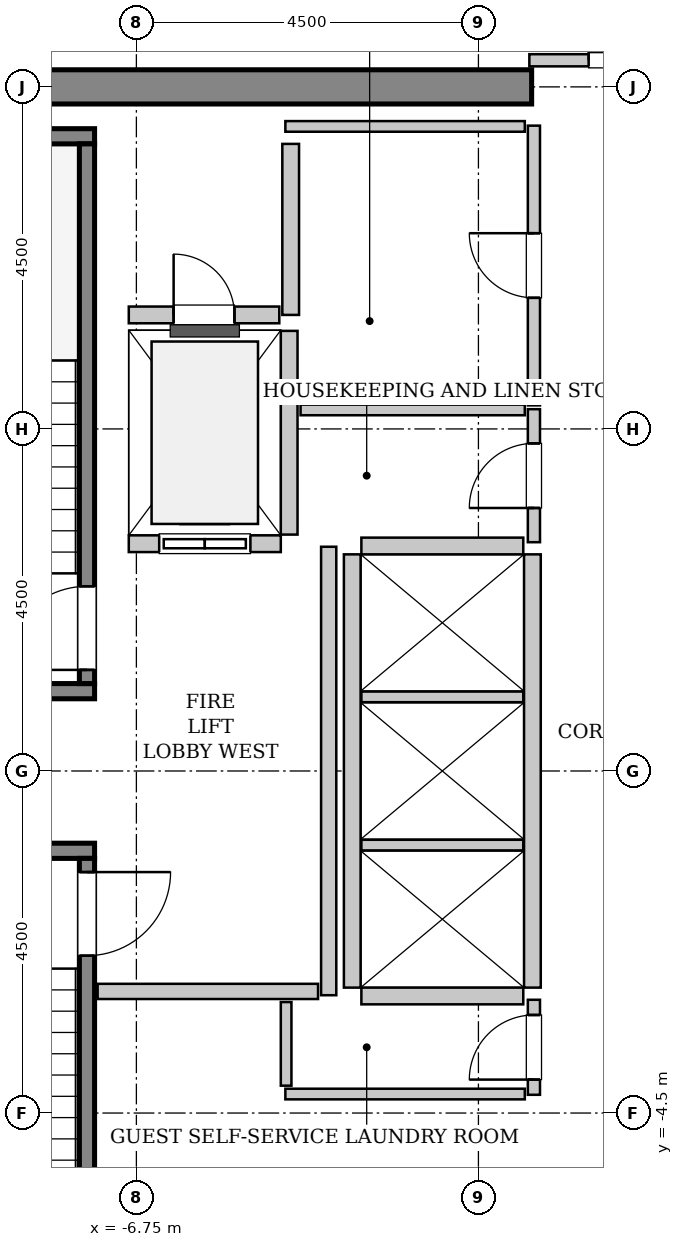
"""IFC4 building model, lengths in metres.
Left out: names, types, materials, properties, quantities, classifications, styles, units other than length and angle.
Written with IfcOpenShell. Run it as: python <this file> out.ifc"""

import sys

from ifc_helpers import new_model, si_unit, direction, frame, frame_2d, origin, place, context, subcontext, project, spatial, rectangle, extrude, source, transform, mapped, element, fill, save


model = new_model("IFC4")
c1 = context("Model", 3, precision=1e-05, world=origin(), true_north=direction((0.0, 1.0)))
c2 = subcontext(c1, "Body", "Model", "MODEL_VIEW")
j1 = project(units=[si_unit("LENGTHUNIT", "METRE"), si_unit("PLANEANGLEUNIT", "RADIAN")], contexts=[c1])
p1 = place(None, origin())
s1 = spatial("IfcSite", under=j1, at=p1, CompositionType="ELEMENT")
p2 = place(p1, origin())
s2 = spatial("IfcBuilding", under=s1, at=p2, CompositionType="ELEMENT")
p3 = place(p2, frame((0.0, 0.0, 221.8)))
s3 = spatial("IfcBuildingStorey", under=s2, at=p3, CompositionType="ELEMENT", Elevation=221.8)
m1 = source(origin(), c2, "Body", "SweptSolid", [
    extrude(rectangle(XDim=9.925, YDim=0.45, at=frame_2d((4.962, 0.0))), origin(), (0.0, 0.0, 1.0), 3.8),
])
p4 = place(p3, frame((-11.475, 9.0, 0.0), z_axis=(0.0, 0.0, 1.0), x_axis=(1.0, 0.0, 0.0)))
e1 = element("IfcWall", 1, at=p4, inside=s3, PredefinedType="SHEAR", context=c2, shape_type="MappedRepresentation", body=[
    mapped(m1, transform((0.0, 0.0, 0.0), x_axis=(1.0, 0.0, 0.0), y_axis=(0.0, 1.0, 0.0), z_axis=(0.0, 0.0, 1.0), scale=1.0)),
])
m2 = source(origin(), c2, "Body", "SweptSolid", [
    extrude(rectangle(XDim=3.4, YDim=0.2, at=frame_2d((1.7, 0.0))), origin(), (0.0, 0.0, 1.0), 3.8),
])
p5 = place(p3, frame((-7.3, 1.05, 0.0), z_axis=(0.0, 0.0, 1.0), x_axis=(-1.0, 0.0, 0.0)))
e2 = element("IfcWall", 2, at=p5, inside=s3, PredefinedType="SOLIDWALL", context=c2, shape_type="MappedRepresentation", body=[
    mapped(m2, transform((0.0, 0.0, 0.0), x_axis=(1.0, 0.0, 0.0), y_axis=(0.0, 1.0, 0.0), z_axis=(0.0, 0.0, 1.0), scale=1.0)),
])
m3 = source(origin(), c2, "Body", "SweptSolid", [
    extrude(rectangle(XDim=3.73, YDim=0.2, at=frame_2d((1.865, 0.0))), origin(), (0.0, 0.0, 1.0), 3.8),
])
p6 = place(p3, frame((-7.3, 8.35, 0.0), z_axis=(0.0, 0.0, 1.0), x_axis=(-1.0, 0.0, 0.0)))
e3 = element("IfcWall", 3, at=p6, inside=s3, PredefinedType="SOLIDWALL", context=c2, shape_type="MappedRepresentation", body=[
    mapped(m3, transform((0.0, 0.0, 0.0), x_axis=(1.0, 0.0, 0.0), y_axis=(0.0, 1.0, 0.0), z_axis=(0.0, 0.0, 1.0), scale=1.0)),
])
m4 = source(origin(), c2, "Body", "SweptSolid", [
    extrude(rectangle(XDim=7.1, YDim=0.2, at=frame_2d((3.55, 0.0))), origin(), (0.0, 0.0, 1.0), 3.8),
])
p7 = place(p3, frame((-7.4, 1.15, 0.0), z_axis=(0.0, 0.0, 1.0), x_axis=(0.0, 1.0, 0.0)))
e4 = element("IfcWall", 4, at=p7, inside=s3, PredefinedType="SOLIDWALL", context=c2, shape_type="MappedRepresentation", body=[
    mapped(m4, transform((0.0, 0.0, 0.0), x_axis=(1.0, 0.0, 0.0), y_axis=(0.0, 1.0, 0.0), z_axis=(0.0, 0.0, 1.0), scale=1.0)),
])
p8 = place(p7, frame((0.18, 0.0, 0.0)))
e5 = element("IfcOpeningElement", 5, at=p8, cuts=e4, PredefinedType="OPENING", context=c2, shape_type="SweptSolid", body=[
    extrude(rectangle(XDim=1.1, YDim=2.15, at=frame_2d((0.55, 1.075))), frame((0.0, 0.11, 0.0), z_axis=(0.0, -1.0, 0.0), x_axis=(1.0, 0.0, 0.0)), (0.0, 0.0, 1.0), 0.22),
])
p9 = place(p3, frame((-10.7, -1.05, 0.0), z_axis=(0.0, 0.0, 1.0), x_axis=(1.0, 0.0, 0.0)))
e6 = element("IfcWall", 6, at=p9, inside=s3, PredefinedType="SOLIDWALL", context=c2, shape_type="MappedRepresentation", body=[
    mapped(m2, transform((0.0, 0.0, 0.0), x_axis=(1.0, 0.0, 0.0), y_axis=(0.0, 1.0, 0.0), z_axis=(0.0, 0.0, 1.0), scale=1.0)),
])
p10 = place(p3, frame((-7.4, -1.15, 0.0), z_axis=(0.0, 0.0, 1.0), x_axis=(0.0, -1.0, 0.0)))
e7 = element("IfcWall", 7, at=p10, inside=s3, PredefinedType="SOLIDWALL", context=c2, shape_type="MappedRepresentation", body=[
    mapped(m4, transform((0.0, 0.0, 0.0), x_axis=(1.0, 0.0, 0.0), y_axis=(0.0, 1.0, 0.0), z_axis=(0.0, 0.0, 1.0), scale=1.0)),
])
p11 = place(p10, frame((0.18, 0.0, 0.0)))
e8 = element("IfcOpeningElement", 8, at=p11, cuts=e7, PredefinedType="OPENING", context=c2, shape_type="SweptSolid", body=[
    extrude(rectangle(XDim=1.1, YDim=2.15, at=frame_2d((0.55, 1.075))), frame((0.0, 0.11, 0.0), z_axis=(0.0, -1.0, 0.0), x_axis=(1.0, 0.0, 0.0)), (0.0, 0.0, 1.0), 0.22),
])
m5 = source(origin(), c2, "Body", "SweptSolid", [
    extrude(rectangle(XDim=2.0, YDim=0.22, at=frame_2d((1.0, 0.0))), origin(), (0.0, 0.0, 1.0), 3.535),
])
p12 = place(p3, frame((-6.85, 2.99, 0.0), z_axis=(0.0, 0.0, 1.0), x_axis=(1.0, 0.0, 0.0)))
e9 = element("IfcWall", 9, at=p12, inside=s3, PredefinedType="SOLIDWALL", context=c2, shape_type="MappedRepresentation", body=[
    mapped(m5, transform((0.0, 0.0, 0.0), x_axis=(1.0, 0.0, 0.0), y_axis=(0.0, 1.0, 0.0), z_axis=(0.0, 0.0, 1.0), scale=1.0)),
])
p13 = place(p12, frame((0.4, 0.0, 0.0)))
e10 = element("IfcOpeningElement", 10, at=p13, cuts=e9, PredefinedType="OPENING", context=c2, shape_type="SweptSolid", body=[
    extrude(rectangle(XDim=1.2, YDim=2.2, at=frame_2d((0.6, 1.1))), frame((0.0, 0.12, 0.0), z_axis=(0.0, -1.0, 0.0), x_axis=(1.0, 0.0, 0.0)), (0.0, 0.0, 1.0), 0.24),
])
m6 = source(origin(), c2, "Body", "SweptSolid", [
    extrude(rectangle(XDim=2.68, YDim=0.22, at=frame_2d((1.34, 0.0))), origin(), (0.0, 0.0, 1.0), 3.535),
])
p14 = place(p3, frame((-4.74, 3.11, 0.0), z_axis=(0.0, 0.0, 1.0), x_axis=(0.0, 1.0, 0.0)))
e11 = element("IfcWall", 11, at=p14, inside=s3, PredefinedType="SOLIDWALL", context=c2, shape_type="MappedRepresentation", body=[
    mapped(m6, transform((0.0, 0.0, 0.0), x_axis=(1.0, 0.0, 0.0), y_axis=(0.0, 1.0, 0.0), z_axis=(0.0, 0.0, 1.0), scale=1.0)),
])
m7 = source(origin(), c2, "Body", "SweptSolid", [
    extrude(rectangle(XDim=5.7, YDim=0.22, at=frame_2d((2.85, 0.0))), origin(), (0.0, 0.0, 1.0), 3.535),
])
for number, where, z_axis, x_axis in (
    (12, (-1.54, -2.85, 0.0), (0.0, 0.0, 1.0), (0.0, 1.0, 0.0)),
    (13, (-3.91, 2.85, 0.0), (0.0, 0.0, 1.0), (0.0, -1.0, 0.0)),
):
    element("IfcWall", number, at=place(p3, frame(where, z_axis=z_axis, x_axis=x_axis)), inside=s3, PredefinedType="SOLIDWALL", context=c2, shape_type="MappedRepresentation", body=[
        mapped(m7, transform((0.0, 0.0, 0.0), x_axis=(1.0, 0.0, 0.0), y_axis=(0.0, 1.0, 0.0), z_axis=(0.0, 0.0, 1.0), scale=1.0)),
    ])
m8 = source(origin(), c2, "Body", "SweptSolid", [
    extrude(rectangle(XDim=2.13, YDim=0.22, at=frame_2d((1.065, 0.0))), origin(), (0.0, 0.0, 1.0), 3.535),
])
p15 = place(p3, frame((-3.79, -2.96, 0.0), z_axis=(0.0, 0.0, 1.0), x_axis=(1.0, 0.0, 0.0)))
e14 = element("IfcWall", 14, at=p15, inside=s3, PredefinedType="SOLIDWALL", context=c2, shape_type="MappedRepresentation", body=[
    mapped(m8, transform((0.0, 0.0, 0.0), x_axis=(1.0, 0.0, 0.0), y_axis=(0.0, 1.0, 0.0), z_axis=(0.0, 0.0, 1.0), scale=1.0)),
])
m9 = source(origin(), c2, "Body", "SweptSolid", [
    extrude(rectangle(XDim=2.13, YDim=0.14, at=frame_2d((1.065, 0.0))), origin(), (0.0, 0.0, 1.0), 3.535),
])
for number, where, z_axis, x_axis in (
    (15, (-3.79, -0.975, 0.0), (0.0, 0.0, 1.0), (1.0, 0.0, 0.0)),
    (16, (-3.79, 0.975, 0.0), (0.0, 0.0, 1.0), (1.0, 0.0, 0.0)),
):
    element("IfcWall", number, at=place(p3, frame(where, z_axis=z_axis, x_axis=x_axis)), inside=s3, PredefinedType="PARTITIONING", context=c2, shape_type="MappedRepresentation", body=[
        mapped(m9, transform((0.0, 0.0, 0.0), x_axis=(1.0, 0.0, 0.0), y_axis=(0.0, 1.0, 0.0), z_axis=(0.0, 0.0, 1.0), scale=1.0)),
    ])
p16 = place(p3, frame((-1.66, 2.96, 0.0), z_axis=(0.0, 0.0, 1.0), x_axis=(-1.0, 0.0, 0.0)))
e17 = element("IfcWall", 17, at=p16, inside=s3, PredefinedType="SOLIDWALL", context=c2, shape_type="MappedRepresentation", body=[
    mapped(m8, transform((0.0, 0.0, 0.0), x_axis=(1.0, 0.0, 0.0), y_axis=(0.0, 1.0, 0.0), z_axis=(0.0, 0.0, 1.0), scale=1.0)),
])
m10 = source(origin(), c2, "Body", "SweptSolid", [
    extrude(rectangle(XDim=2.25, YDim=0.22, at=frame_2d((1.125, 0.0))), origin(), (0.0, 0.0, 1.0), 3.535),
])
p17 = place(p3, frame((-4.72, 6.0, 0.0), z_axis=(0.0, 0.0, 1.0), x_axis=(0.0, 1.0, 0.0)))
e18 = element("IfcWall", 18, at=p17, inside=s3, PredefinedType="SOLIDWALL", context=c2, shape_type="MappedRepresentation", body=[
    mapped(m10, transform((0.0, 0.0, 0.0), x_axis=(1.0, 0.0, 0.0), y_axis=(0.0, 1.0, 0.0), z_axis=(0.0, 0.0, 1.0), scale=1.0)),
])
m11 = source(origin(), c2, "Body", "SweptSolid", [
    extrude(rectangle(XDim=1.98, YDim=0.22, at=frame_2d((0.99, 0.0))), origin(), (0.0, 0.0, 1.0), 3.535),
])
p18 = place(p3, frame((-6.85, 6.0, 0.0), z_axis=(0.0, 0.0, 1.0), x_axis=(1.0, 0.0, 0.0)))
e19 = element("IfcWall", 19, at=p18, inside=s3, PredefinedType="SOLIDWALL", context=c2, shape_type="MappedRepresentation", body=[
    mapped(m11, transform((0.0, 0.0, 0.0), x_axis=(1.0, 0.0, 0.0), y_axis=(0.0, 1.0, 0.0), z_axis=(0.0, 0.0, 1.0), scale=1.0)),
])
p19 = place(p18, frame((0.59, 0.0, 0.0)))
e20 = element("IfcOpeningElement", 20, at=p19, cuts=e19, PredefinedType="OPENING", context=c2, shape_type="SweptSolid", body=[
    extrude(rectangle(XDim=0.8, YDim=2.0, at=frame_2d((0.4, 1.0))), frame((0.0, 0.12, 0.0), z_axis=(0.0, -1.0, 0.0), x_axis=(1.0, 0.0, 0.0)), (0.0, 0.0, 1.0), 0.24),
])
m12 = source(origin(), c2, "Body", "SweptSolid", [
    extrude(rectangle(XDim=5.9, YDim=0.2, at=frame_2d((2.95, 0.0))), origin(), (0.0, 0.0, 1.0), 3.535),
])
p20 = place(p3, frame((-4.22, -2.95, 0.0), z_axis=(0.0, 0.0, 1.0), x_axis=(0.0, 1.0, 0.0)))
e21 = element("IfcWall", 21, at=p20, inside=s3, PredefinedType="PARTITIONING", context=c2, shape_type="MappedRepresentation", body=[
    mapped(m12, transform((0.0, 0.0, 0.0), x_axis=(1.0, 0.0, 0.0), y_axis=(0.0, 1.0, 0.0), z_axis=(0.0, 0.0, 1.0), scale=1.0)),
])
m13 = source(origin(), c2, "Body", "SweptSolid", [
    extrude(rectangle(XDim=2.9, YDim=0.2, at=frame_2d((1.45, 0.0))), origin(), (0.0, 0.0, 1.0), 3.535),
])
p21 = place(p3, frame((-7.26, -2.9, 0.0), z_axis=(0.0, 0.0, 1.0), x_axis=(1.0, 0.0, 0.0)))
e22 = element("IfcWall", 22, at=p21, inside=s3, PredefinedType="PARTITIONING", context=c2, shape_type="MappedRepresentation", body=[
    mapped(m13, transform((0.0, 0.0, 0.0), x_axis=(1.0, 0.0, 0.0), y_axis=(0.0, 1.0, 0.0), z_axis=(0.0, 0.0, 1.0), scale=1.0)),
])
m14 = source(origin(), c2, "Body", "SweptSolid", [
    extrude(rectangle(XDim=3.16, YDim=0.16, at=frame_2d((1.58, 0.0))), origin(), (0.0, 0.0, 1.0), 2.625),
])
p22 = place(p3, frame((-1.58, 9.35, 0.0), z_axis=(0.0, 0.0, 1.0), x_axis=(1.0, 0.0, 0.0)))
e23 = element("IfcWall", 23, at=p22, inside=s3, PredefinedType="PARTITIONING", context=c2, shape_type="MappedRepresentation", body=[
    mapped(m14, transform((0.0, 0.0, 0.0), x_axis=(1.0, 0.0, 0.0), y_axis=(0.0, 1.0, 0.0), z_axis=(0.0, 0.0, 1.0), scale=1.0)),
])
p23 = place(p22, frame((0.78, 0.0, 0.0)))
e24 = element("IfcOpeningElement", 24, at=p23, cuts=e23, PredefinedType="OPENING", context=c2, shape_type="SweptSolid", body=[
    extrude(rectangle(XDim=1.6, YDim=2.3, at=frame_2d((0.8, 1.15))), frame((0.0, 0.09, 0.0), z_axis=(0.0, -1.0, 0.0), x_axis=(1.0, 0.0, 0.0)), (0.0, 0.0, 1.0), 0.18),
])
m15 = source(origin(), c2, "Body", "SweptSolid", [
    extrude(rectangle(XDim=1.75, YDim=0.16, at=frame_2d((0.875, 0.0))), origin(), (0.0, 0.0, 1.0), 3.535),
])
p24 = place(p3, frame((-1.52, 3.01, 0.0), z_axis=(0.0, 0.0, 1.0), x_axis=(0.0, 1.0, 0.0)))
e25 = element("IfcWall", 25, at=p24, inside=s3, PredefinedType="PARTITIONING", context=c2, shape_type="MappedRepresentation", body=[
    mapped(m15, transform((0.0, 0.0, 0.0), x_axis=(1.0, 0.0, 0.0), y_axis=(0.0, 1.0, 0.0), z_axis=(0.0, 0.0, 1.0), scale=1.0)),
])
p25 = place(p24, frame((0.45, 0.0, 0.0)))
e26 = element("IfcOpeningElement", 26, at=p25, cuts=e25, PredefinedType="OPENING", context=c2, shape_type="SweptSolid", body=[
    extrude(rectangle(XDim=0.85, YDim=2.1, at=frame_2d((0.425, 1.05))), frame((0.0, 0.09, 0.0), z_axis=(0.0, -1.0, 0.0), x_axis=(1.0, 0.0, 0.0)), (0.0, 0.0, 1.0), 0.18),
])
m16 = source(origin(), c2, "Body", "SweptSolid", [
    extrude(rectangle(XDim=2.95, YDim=0.14, at=frame_2d((1.475, 0.0))), origin(), (0.0, 0.0, 1.0), 3.535),
])
p26 = place(p3, frame((-4.59, 4.75, 0.0), z_axis=(0.0, 0.0, 1.0), x_axis=(1.0, 0.0, 0.0)))
e27 = element("IfcWall", 27, at=p26, inside=s3, PredefinedType="PARTITIONING", context=c2, shape_type="MappedRepresentation", body=[
    mapped(m16, transform((0.0, 0.0, 0.0), x_axis=(1.0, 0.0, 0.0), y_axis=(0.0, 1.0, 0.0), z_axis=(0.0, 0.0, 1.0), scale=1.0)),
])
m17 = source(origin(), c2, "Body", "SweptSolid", [
    extrude(rectangle(XDim=3.68, YDim=0.16, at=frame_2d((1.84, 0.0))), origin(), (0.0, 0.0, 1.0), 3.535),
])
p27 = place(p3, frame((-1.52, 4.81, 0.0), z_axis=(0.0, 0.0, 1.0), x_axis=(0.0, 1.0, 0.0)))
e28 = element("IfcWall", 28, at=p27, inside=s3, PredefinedType="PARTITIONING", context=c2, shape_type="MappedRepresentation", body=[
    mapped(m17, transform((0.0, 0.0, 0.0), x_axis=(1.0, 0.0, 0.0), y_axis=(0.0, 1.0, 0.0), z_axis=(0.0, 0.0, 1.0), scale=1.0)),
])
p28 = place(p27, frame((1.415, 0.0, 0.0)))
e29 = element("IfcOpeningElement", 29, at=p28, cuts=e28, PredefinedType="OPENING", context=c2, shape_type="SweptSolid", body=[
    extrude(rectangle(XDim=0.85, YDim=2.1, at=frame_2d((0.425, 1.05))), frame((0.0, 0.09, 0.0), z_axis=(0.0, -1.0, 0.0), x_axis=(1.0, 0.0, 0.0)), (0.0, 0.0, 1.0), 0.18),
])
m18 = source(origin(), c2, "Body", "SweptSolid", [
    extrude(rectangle(XDim=3.15, YDim=0.14, at=frame_2d((1.575, 0.0))), origin(), (0.0, 0.0, 1.0), 3.535),
])
p29 = place(p3, frame((-4.79, 8.48, 0.0), z_axis=(0.0, 0.0, 1.0), x_axis=(1.0, 0.0, 0.0)))
e30 = element("IfcWall", 30, at=p29, inside=s3, PredefinedType="PARTITIONING", context=c2, shape_type="MappedRepresentation", body=[
    mapped(m18, transform((0.0, 0.0, 0.0), x_axis=(1.0, 0.0, 0.0), y_axis=(0.0, 1.0, 0.0), z_axis=(0.0, 0.0, 1.0), scale=1.0)),
])
m19 = source(origin(), c2, "Body", "SweptSolid", [
    extrude(rectangle(XDim=1.25, YDim=0.16, at=frame_2d((0.625, 0.0))), origin(), (0.0, 0.0, 1.0), 3.535),
])
p30 = place(p3, frame((-1.52, -4.26, 0.0), z_axis=(0.0, 0.0, 1.0), x_axis=(0.0, 1.0, 0.0)))
e31 = element("IfcWall", 31, at=p30, inside=s3, PredefinedType="PARTITIONING", context=c2, shape_type="MappedRepresentation", body=[
    mapped(m19, transform((0.0, 0.0, 0.0), x_axis=(1.0, 0.0, 0.0), y_axis=(0.0, 1.0, 0.0), z_axis=(0.0, 0.0, 1.0), scale=1.0)),
])
p31 = place(p30, frame((0.2, 0.0, 0.0)))
e32 = element("IfcOpeningElement", 32, at=p31, cuts=e31, PredefinedType="OPENING", context=c2, shape_type="SweptSolid", body=[
    extrude(rectangle(XDim=0.85, YDim=2.1, at=frame_2d((0.425, 1.05))), frame((0.0, 0.09, 0.0), z_axis=(0.0, -1.0, 0.0), x_axis=(1.0, 0.0, 0.0)), (0.0, 0.0, 1.0), 0.18),
])
p32 = place(p3, frame((-4.79, -4.25, 0.0), z_axis=(0.0, 0.0, 1.0), x_axis=(1.0, 0.0, 0.0)))
e33 = element("IfcWall", 33, at=p32, inside=s3, PredefinedType="PARTITIONING", context=c2, shape_type="MappedRepresentation", body=[
    mapped(m18, transform((0.0, 0.0, 0.0), x_axis=(1.0, 0.0, 0.0), y_axis=(0.0, 1.0, 0.0), z_axis=(0.0, 0.0, 1.0), scale=1.0)),
])
m20 = source(origin(), c2, "Body", "SweptSolid", [
    extrude(rectangle(XDim=1.1, YDim=0.14, at=frame_2d((0.55, 0.0))), origin(), (0.0, 0.0, 1.0), 3.535),
])
p33 = place(p3, frame((-4.78, -4.14, 0.0), z_axis=(0.0, 0.0, 1.0), x_axis=(0.0, 1.0, 0.0)))
e34 = element("IfcWall", 34, at=p33, inside=s3, PredefinedType="PARTITIONING", context=c2, shape_type="MappedRepresentation", body=[
    mapped(m20, transform((0.0, 0.0, 0.0), x_axis=(1.0, 0.0, 0.0), y_axis=(0.0, 1.0, 0.0), z_axis=(0.0, 0.0, 1.0), scale=1.0)),
])
m21 = source(origin(), c2, "Body", "SweptSolid", [
    extrude(rectangle(XDim=1.1, YDim=2.15, at=frame_2d((0.55, 1.075))), frame((0.0, 0.025, 0.0), z_axis=(0.0, -1.0, 0.0), x_axis=(1.0, 0.0, 0.0)), (0.0, 0.0, 1.0), 0.05),
])
p34 = place(p8, origin())
e35 = element("IfcDoor", 35, at=p34, inside=s3, OperationType="SINGLE_SWING_LEFT", PredefinedType="DOOR", context=c2, shape_type="MappedRepresentation", body=[
    mapped(m21, transform((0.0, 0.0, 0.0), x_axis=(1.0, 0.0, 0.0), y_axis=(0.0, 1.0, 0.0), z_axis=(0.0, 0.0, 1.0), scale=1.0)),
])
fill(e5, e35)
p35 = place(p11, origin())
e36 = element("IfcDoor", 36, at=p35, inside=s3, OperationType="SINGLE_SWING_LEFT", PredefinedType="DOOR", context=c2, shape_type="MappedRepresentation", body=[
    mapped(m21, transform((0.0, 0.0, 0.0), x_axis=(1.0, 0.0, 0.0), y_axis=(0.0, 1.0, 0.0), z_axis=(0.0, 0.0, 1.0), scale=1.0)),
])
fill(e8, e36)
m22 = source(origin(), c2, "Body", "SweptSolid", [
    extrude(rectangle(XDim=1.2, YDim=2.2, at=frame_2d((0.6, 1.1))), frame((0.0, 0.025, 0.0), z_axis=(0.0, -1.0, 0.0), x_axis=(1.0, 0.0, 0.0)), (0.0, 0.0, 1.0), 0.05),
])
p36 = place(p13, origin())
e37 = element("IfcDoor", 37, at=p36, inside=s3, OperationType="SLIDING_TO_LEFT", PredefinedType="DOOR", context=c2, shape_type="MappedRepresentation", body=[
    mapped(m22, transform((0.0, 0.0, 0.0), x_axis=(1.0, 0.0, 0.0), y_axis=(0.0, 1.0, 0.0), z_axis=(0.0, 0.0, 1.0), scale=1.0)),
])
fill(e10, e37)
m23 = source(origin(), c2, "Body", "SweptSolid", [
    extrude(rectangle(XDim=0.8, YDim=2.0, at=frame_2d((0.4, 1.0))), frame((0.0, 0.025, 0.0), z_axis=(0.0, -1.0, 0.0), x_axis=(1.0, 0.0, 0.0)), (0.0, 0.0, 1.0), 0.05),
])
p37 = place(p19, origin())
e38 = element("IfcDoor", 38, at=p37, inside=s3, OperationType="SINGLE_SWING_LEFT", PredefinedType="TRAPDOOR", context=c2, shape_type="MappedRepresentation", body=[
    mapped(m23, transform((0.0, 0.0, 0.0), x_axis=(1.0, 0.0, 0.0), y_axis=(0.0, 1.0, 0.0), z_axis=(0.0, 0.0, 1.0), scale=1.0)),
])
fill(e20, e38)
m24 = source(origin(), c2, "Body", "SweptSolid", [
    extrude(rectangle(XDim=1.6, YDim=2.3, at=frame_2d((0.8, 1.15))), frame((0.0, 0.025, 0.0), z_axis=(0.0, -1.0, 0.0), x_axis=(1.0, 0.0, 0.0)), (0.0, 0.0, 1.0), 0.05),
])
p38 = place(p23, origin())
e39 = element("IfcDoor", 39, at=p38, inside=s3, OperationType="DOUBLE_DOOR_SINGLE_SWING", PredefinedType="DOOR", context=c2, shape_type="MappedRepresentation", body=[
    mapped(m24, transform((0.0, 0.0, 0.0), x_axis=(1.0, 0.0, 0.0), y_axis=(0.0, 1.0, 0.0), z_axis=(0.0, 0.0, 1.0), scale=1.0)),
])
fill(e24, e39)
m25 = source(origin(), c2, "Body", "SweptSolid", [
    extrude(rectangle(XDim=0.85, YDim=2.1, at=frame_2d((0.425, 1.05))), frame((0.0, 0.025, 0.0), z_axis=(0.0, -1.0, 0.0), x_axis=(1.0, 0.0, 0.0)), (0.0, 0.0, 1.0), 0.05),
])
p39 = place(p25, origin())
e40 = element("IfcDoor", 40, at=p39, inside=s3, OperationType="SINGLE_SWING_LEFT", PredefinedType="DOOR", context=c2, shape_type="MappedRepresentation", body=[
    mapped(m25, transform((0.0, 0.0, 0.0), x_axis=(1.0, 0.0, 0.0), y_axis=(0.0, 1.0, 0.0), z_axis=(0.0, 0.0, 1.0), scale=1.0)),
])
fill(e26, e40)
p40 = place(p28, origin())
e41 = element("IfcDoor", 41, at=p40, inside=s3, OperationType="SINGLE_SWING_RIGHT", PredefinedType="DOOR", context=c2, shape_type="MappedRepresentation", body=[
    mapped(m25, transform((0.0, 0.0, 0.0), x_axis=(1.0, 0.0, 0.0), y_axis=(0.0, 1.0, 0.0), z_axis=(0.0, 0.0, 1.0), scale=1.0)),
])
fill(e29, e41)
p41 = place(p31, origin())
e42 = element("IfcDoor", 42, at=p41, inside=s3, OperationType="SINGLE_SWING_LEFT", PredefinedType="DOOR", context=c2, shape_type="MappedRepresentation", body=[
    mapped(m25, transform((0.0, 0.0, 0.0), x_axis=(1.0, 0.0, 0.0), y_axis=(0.0, 1.0, 0.0), z_axis=(0.0, 0.0, 1.0), scale=1.0)),
])
fill(e32, e42)
save(model, sys.argv[1])
